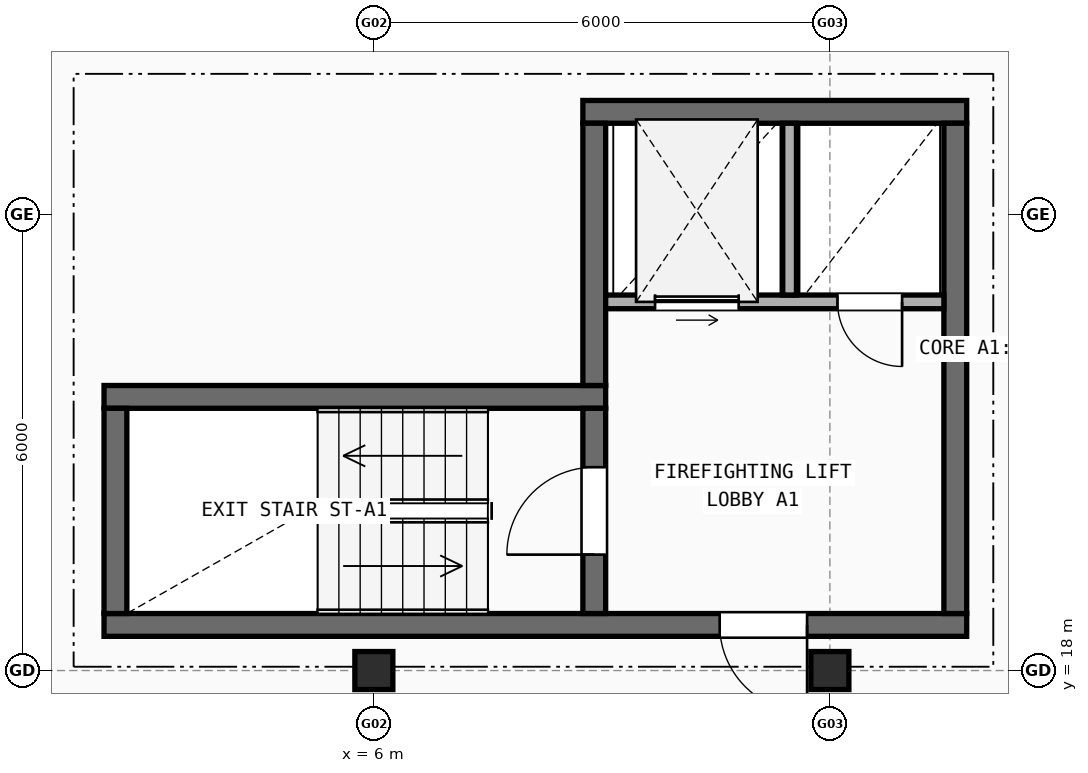
"""IFC4 building model, lengths in metres.
Left out: names, types, materials, properties, quantities, classifications, styles, units other than length and angle.
Written with IfcOpenShell. Run it as: python <this file> out.ifc"""

import sys

from ifc_helpers import new_model, si_unit, direction, frame, frame_2d, origin, origin_2d, place, context, subcontext, project, spatial, rectangle, extrude, element, fill, save


model = new_model("IFC4")
c1 = context("Model", 3, precision=1e-05, world=origin(), true_north=direction((0.0, 1.0)))
c2 = subcontext(c1, "Body", "Model", "MODEL_VIEW")
j1 = project(units=[si_unit("LENGTHUNIT", "METRE"), si_unit("PLANEANGLEUNIT", "RADIAN")], contexts=[c1])
p1 = place(None, origin())
s1 = spatial("IfcSite", under=j1, at=p1, CompositionType="ELEMENT")
p2 = place(p1, origin())
s2 = spatial("IfcBuilding", under=s1, at=p2, CompositionType="ELEMENT")
p3 = place(p2, frame((0.0, 0.0, 26.9)))
s3 = spatial("IfcBuildingStorey", under=s2, at=p3, CompositionType="ELEMENT", Elevation=26.9)
for number, where, z_axis, x_axis in (
    (1, (6.0, 18.0, 0.0), (0.0, 0.0, 1.0), (1.0, 0.0, 0.0)),
    (2, (12.0, 18.0, 0.0), (0.0, 0.0, 1.0), (1.0, 0.0, 0.0)),
):
    element("IfcColumn", number, at=place(p3, frame(where, z_axis=z_axis, x_axis=x_axis)), inside=s3, PredefinedType="COLUMN", context=c2, shape_type="SweptSolid", body=[
        extrude(rectangle(XDim=0.5, YDim=0.5, at=origin_2d()), origin(), (0.0, 0.0, 1.0), 2.98),
    ])
p4 = place(p3, frame((2.45, 18.6, 0.0), z_axis=(0.0, 0.0, 1.0), x_axis=(1.0, 0.0, 0.0)))
e3 = element("IfcWall", 3, at=p4, inside=s3, PredefinedType="SHEAR", context=c2, shape_type="SweptSolid", body=[
    extrude(rectangle(XDim=11.35, YDim=0.3, at=frame_2d((5.675, 0.0))), origin(), (0.0, 0.0, 1.0), 2.98),
])
p5 = place(p4, frame((8.1, 0.0, 0.0)))
e4 = element("IfcOpeningElement", 4, at=p5, cuts=e3, PredefinedType="OPENING", context=c2, shape_type="SweptSolid", body=[
    extrude(rectangle(XDim=1.15, YDim=2.15, at=frame_2d((0.575, 1.075))), frame((0.0, 0.16, 0.0), z_axis=(0.0, -1.0, 0.0), x_axis=(1.0, 0.0, 0.0)), (0.0, 0.0, 1.0), 0.32),
])
p6 = place(p3, frame((9.05, 21.6, 0.0), z_axis=(0.0, 0.0, 1.0), x_axis=(-1.0, 0.0, 0.0)))
e5 = element("IfcWall", 5, at=p6, inside=s3, PredefinedType="SHEAR", context=c2, shape_type="SweptSolid", body=[
    extrude(rectangle(XDim=6.6, YDim=0.3, at=frame_2d((3.3, 0.0))), origin(), (0.0, 0.0, 1.0), 2.98),
])
p7 = place(p3, frame((2.6, 21.45, 0.0), z_axis=(0.0, 0.0, 1.0), x_axis=(0.0, -1.0, 0.0)))
e6 = element("IfcWall", 6, at=p7, inside=s3, PredefinedType="SHEAR", context=c2, shape_type="SweptSolid", body=[
    extrude(rectangle(XDim=2.7, YDim=0.3, at=frame_2d((1.35, 0.0))), origin(), (0.0, 0.0, 1.0), 2.98),
])
p8 = place(p3, frame((8.9, 18.75, 0.0), z_axis=(0.0, 0.0, 1.0), x_axis=(0.0, 1.0, 0.0)))
e7 = element("IfcWall", 7, at=p8, inside=s3, PredefinedType="SHEAR", context=c2, shape_type="SweptSolid", body=[
    extrude(rectangle(XDim=2.7, YDim=0.3, at=frame_2d((1.35, 0.0))), origin(), (0.0, 0.0, 1.0), 2.98),
])
p9 = place(p8, frame((0.775, 0.0, 0.0)))
e8 = element("IfcOpeningElement", 8, at=p9, cuts=e7, PredefinedType="OPENING", context=c2, shape_type="SweptSolid", body=[
    extrude(rectangle(XDim=1.15, YDim=2.15, at=frame_2d((0.575, 1.075))), frame((0.0, 0.16, 0.0), z_axis=(0.0, -1.0, 0.0), x_axis=(1.0, 0.0, 0.0)), (0.0, 0.0, 1.0), 0.32),
])
p10 = place(p3, frame((13.8, 25.35, 0.0), z_axis=(0.0, 0.0, 1.0), x_axis=(-1.0, 0.0, 0.0)))
e9 = element("IfcWall", 9, at=p10, inside=s3, PredefinedType="SHEAR", context=c2, shape_type="SweptSolid", body=[
    extrude(rectangle(XDim=5.05, YDim=0.3, at=frame_2d((2.525, 0.0))), origin(), (0.0, 0.0, 1.0), 2.98),
])
p11 = place(p3, frame((13.65, 18.75, 0.0), z_axis=(0.0, 0.0, 1.0), x_axis=(0.0, 1.0, 0.0)))
e10 = element("IfcWall", 10, at=p11, inside=s3, PredefinedType="SHEAR", context=c2, shape_type="SweptSolid", body=[
    extrude(rectangle(XDim=6.45, YDim=0.3, at=frame_2d((3.225, 0.0))), origin(), (0.0, 0.0, 1.0), 2.98),
])
p12 = place(p3, frame((8.9, 21.75, 0.0), z_axis=(0.0, 0.0, 1.0), x_axis=(0.0, 1.0, 0.0)))
e11 = element("IfcWall", 11, at=p12, inside=s3, PredefinedType="SHEAR", context=c2, shape_type="SweptSolid", body=[
    extrude(rectangle(XDim=3.45, YDim=0.3, at=frame_2d((1.725, 0.0))), origin(), (0.0, 0.0, 1.0), 2.98),
])
p13 = place(p3, frame((9.05, 22.85, 0.0), z_axis=(0.0, 0.0, 1.0), x_axis=(1.0, 0.0, 0.0)))
e12 = element("IfcWall", 12, at=p13, inside=s3, PredefinedType="SOLIDWALL", context=c2, shape_type="SweptSolid", body=[
    extrude(rectangle(XDim=4.45, YDim=0.18, at=frame_2d((2.225, 0.0))), origin(), (0.0, 0.0, 1.0), 2.98),
])
p14 = place(p13, frame((0.65, 0.0, 0.0)))
e13 = element("IfcOpeningElement", 13, at=p14, cuts=e12, PredefinedType="OPENING", context=c2, shape_type="SweptSolid", body=[
    extrude(rectangle(XDim=1.1, YDim=2.15, at=frame_2d((0.55, 1.075))), frame((0.0, 0.1, 0.0), z_axis=(0.0, -1.0, 0.0), x_axis=(1.0, 0.0, 0.0)), (0.0, 0.0, 1.0), 0.2),
])
p15 = place(p13, frame((3.05, 0.0, 0.0)))
e14 = element("IfcOpeningElement", 14, at=p15, cuts=e12, PredefinedType="OPENING", context=c2, shape_type="SweptSolid", body=[
    extrude(rectangle(XDim=0.85, YDim=2.1, at=frame_2d((0.425, 1.05))), frame((0.0, 0.1, 0.0), z_axis=(0.0, -1.0, 0.0), x_axis=(1.0, 0.0, 0.0)), (0.0, 0.0, 1.0), 0.2),
])
p16 = place(p3, frame((11.47, 22.94, 0.0), z_axis=(0.0, 0.0, 1.0), x_axis=(0.0, 1.0, 0.0)))
e15 = element("IfcWall", 15, at=p16, inside=s3, PredefinedType="SOLIDWALL", context=c2, shape_type="SweptSolid", body=[
    extrude(rectangle(XDim=2.26, YDim=0.18, at=frame_2d((1.13, 0.0))), origin(), (0.0, 0.0, 1.0), 2.98),
])
p17 = place(p5, origin())
e16 = element("IfcDoor", 16, at=p17, inside=s3, OperationType="SINGLE_SWING_RIGHT", PredefinedType="DOOR", context=c2, shape_type="SweptSolid", body=[
    extrude(rectangle(XDim=1.15, YDim=2.15, at=frame_2d((0.575, 1.075))), frame((0.0, 0.025, 0.0), z_axis=(0.0, -1.0, 0.0), x_axis=(1.0, 0.0, 0.0)), (0.0, 0.0, 1.0), 0.05),
])
fill(e4, e16)
p18 = place(p9, origin())
e17 = element("IfcDoor", 17, at=p18, inside=s3, OperationType="SINGLE_SWING_LEFT", PredefinedType="DOOR", context=c2, shape_type="SweptSolid", body=[
    extrude(rectangle(XDim=1.15, YDim=2.15, at=frame_2d((0.575, 1.075))), frame((0.0, 0.025, 0.0), z_axis=(0.0, -1.0, 0.0), x_axis=(1.0, 0.0, 0.0)), (0.0, 0.0, 1.0), 0.05),
])
fill(e8, e17)
p19 = place(p14, origin())
e18 = element("IfcDoor", 18, at=p19, inside=s3, OperationType="SLIDING_TO_LEFT", PredefinedType="DOOR", context=c2, shape_type="SweptSolid", body=[
    extrude(rectangle(XDim=1.1, YDim=2.15, at=frame_2d((0.55, 1.075))), frame((0.0, 0.025, 0.0), z_axis=(0.0, -1.0, 0.0), x_axis=(1.0, 0.0, 0.0)), (0.0, 0.0, 1.0), 0.05),
])
fill(e13, e18)
p20 = place(p15, frame((0.85, 0.0, 0.0), z_axis=(0.0, 0.0, 1.0), x_axis=(-1.0, 0.0, 0.0)))
e19 = element("IfcDoor", 19, at=p20, inside=s3, OperationType="SINGLE_SWING_RIGHT", PredefinedType="DOOR", context=c2, shape_type="SweptSolid", body=[
    extrude(rectangle(XDim=0.85, YDim=2.1, at=frame_2d((0.425, 1.05))), frame((0.0, 0.025, 0.0), z_axis=(0.0, -1.0, 0.0), x_axis=(1.0, 0.0, 0.0)), (0.0, 0.0, 1.0), 0.05),
])
fill(e14, e19)
save(model, sys.argv[1])
